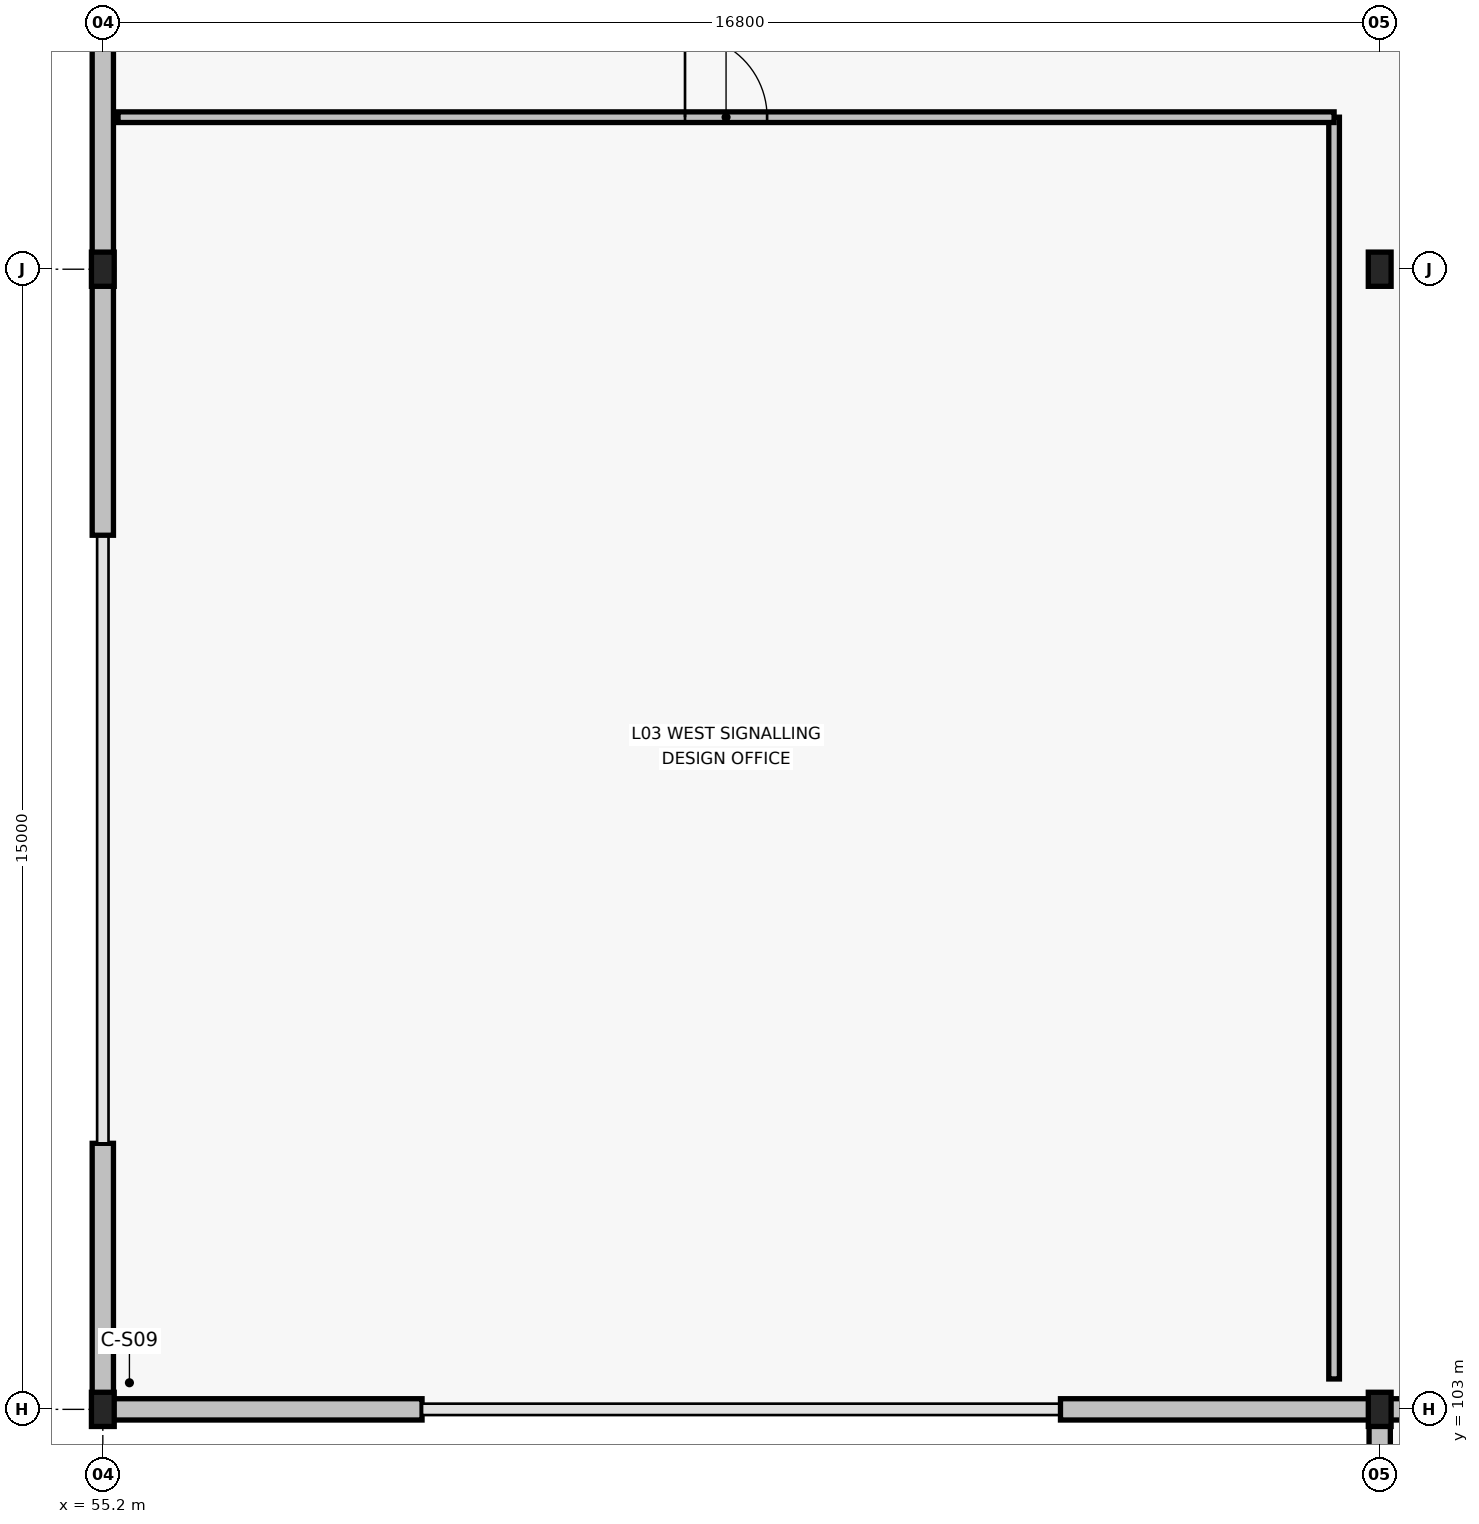
"""IFC4 building model, lengths in metres.
Left out: names, types, materials, properties, quantities, classifications, styles, units other than length and angle.
Written with IfcOpenShell. Run it as: python <this file> out.ifc"""

import sys

from ifc_helpers import new_model, si_unit, direction, frame, frame_2d, origin, origin_2d, place, context, subcontext, project, spatial, rectangle, i_section, extrude, element, fill, save


model = new_model("IFC4")
c1 = context("Model", 3, precision=1e-05, world=origin(), true_north=direction((0.0, 1.0)))
c2 = subcontext(c1, "Body", "Model", "MODEL_VIEW")
j1 = project(units=[si_unit("LENGTHUNIT", "METRE"), si_unit("PLANEANGLEUNIT", "RADIAN")], contexts=[c1])
p1 = place(None, origin())
s1 = spatial("IfcSite", under=j1, at=p1, CompositionType="ELEMENT")
p2 = place(p1, origin())
s2 = spatial("IfcBuilding", under=s1, at=p2, CompositionType="ELEMENT")
p3 = place(p2, frame((0.0, 0.0, 16.8)))
s3 = spatial("IfcBuildingStorey", under=s2, at=p3, CompositionType="ELEMENT", Elevation=16.8)
for number, where, z_axis, x_axis in (
    (1, (55.2, 103.0, 0.0), (0.0, 0.0, 1.0), (1.0, 0.0, 0.0)),
    (2, (55.2, 118.0, 0.0), (0.0, 0.0, 1.0), (1.0, 0.0, 0.0)),
    (3, (72.0, 103.0, 0.0), (0.0, 0.0, 1.0), (1.0, 0.0, 0.0)),
    (4, (72.0, 118.0, 0.0), (0.0, 0.0, 1.0), (1.0, 0.0, 0.0)),
):
    element("IfcColumn", number, at=place(p3, frame(where, z_axis=z_axis, x_axis=x_axis)), inside=s3, PredefinedType="COLUMN", context=c2, shape_type="SweptSolid", body=[
        extrude(i_section(OverallWidth=0.3, OverallDepth=0.45, WebThickness=0.014, FlangeThickness=0.026, FilletRadius=0.027, at=origin_2d()), origin(), (0.0, 0.0, 1.0), 4.2),
    ])
for number, where, z_axis, x_axis in (
    (5, (55.2, 103.0, 0.0), (0.0, 0.0, 1.0), (1.0, 0.0, 0.0)),
    (6, (67.8, 103.0, 0.0), (0.0, 0.0, 1.0), (1.0, 0.0, 0.0)),
    (7, (72.0, 103.0, 0.0), (0.0, 0.0, 1.0), (1.0, 0.0, 0.0)),
):
    element("IfcWall", number, at=place(p3, frame(where, z_axis=z_axis, x_axis=x_axis)), inside=s3, PredefinedType="STANDARD", context=c2, shape_type="SweptSolid", body=[
        extrude(rectangle(XDim=4.2, YDim=0.28, at=frame_2d((2.1, 0.0))), origin(), (0.0, 0.0, 1.0), 3.605),
    ])
p4 = place(p3, frame((55.2, 103.14, 0.0), z_axis=(0.0, 0.0, 1.0), x_axis=(0.0, 1.0, 0.0)))
e8 = element("IfcWall", 8, at=p4, inside=s3, PredefinedType="STANDARD", context=c2, shape_type="SweptSolid", body=[
    extrude(rectangle(XDim=3.36, YDim=0.28, at=frame_2d((1.68, 0.0))), origin(), (0.0, 0.0, 1.0), 3.605),
])
for number, where, z_axis, x_axis in (
    (9, (55.2, 114.5, 0.0), (0.0, 0.0, 1.0), (0.0, 1.0, 0.0)),
    (10, (55.2, 118.0, 0.0), (0.0, 0.0, 1.0), (0.0, 1.0, 0.0)),
):
    element("IfcWall", number, at=place(p3, frame(where, z_axis=z_axis, x_axis=x_axis)), inside=s3, PredefinedType="STANDARD", context=c2, shape_type="SweptSolid", body=[
        extrude(rectangle(XDim=3.5, YDim=0.28, at=frame_2d((1.75, 0.0))), origin(), (0.0, 0.0, 1.0), 3.605),
    ])
p5 = place(p3, frame((72.0, 102.14, 0.0), z_axis=(0.0, 0.0, 1.0), x_axis=(0.0, 1.0, 0.0)))
e11 = element("IfcWall", 11, at=p5, inside=s3, PredefinedType="STANDARD", context=c2, shape_type="SweptSolid", body=[
    extrude(rectangle(XDim=0.72, YDim=0.28, at=frame_2d((0.36, 0.0))), origin(), (0.0, 0.0, 1.0), 3.37),
])
p6 = place(p3, frame((71.4, 103.4, 0.0), z_axis=(0.0, 0.0, 1.0), x_axis=(0.0, 1.0, 0.0)))
e12 = element("IfcWall", 12, at=p6, inside=s3, PredefinedType="PARTITIONING", context=c2, shape_type="SweptSolid", body=[
    extrude(rectangle(XDim=16.6, YDim=0.14, at=frame_2d((8.3, 0.0))), origin(), (0.0, 0.0, 1.0), 3.495),
])
p7 = place(p3, frame((71.4, 120.0, 0.0), z_axis=(0.0, 0.0, 1.0), x_axis=(-1.0, 0.0, 0.0)))
e13 = element("IfcWall", 13, at=p7, inside=s3, PredefinedType="PARTITIONING", context=c2, shape_type="SweptSolid", body=[
    extrude(rectangle(XDim=16.0, YDim=0.14, at=frame_2d((8.0, 0.0))), origin(), (0.0, 0.0, 1.0), 4.0),
])
p8 = place(p7, frame((7.46, 0.0, 0.0)))
e14 = element("IfcOpeningElement", 14, at=p8, cuts=e13, PredefinedType="OPENING", context=c2, shape_type="SweptSolid", body=[
    extrude(rectangle(XDim=1.08, YDim=2.1, at=frame_2d((0.54, 1.05))), frame((0.0, 0.08, 0.0), z_axis=(0.0, -1.0, 0.0), x_axis=(1.0, 0.0, 0.0)), (0.0, 0.0, 1.0), 0.16),
])
p9 = place(p8, origin())
e15 = element("IfcDoor", 15, at=p9, inside=s3, OperationType="SINGLE_SWING_RIGHT", PredefinedType="DOOR", context=c2, shape_type="SweptSolid", body=[
    extrude(rectangle(XDim=1.08, YDim=2.1, at=frame_2d((0.54, 1.05))), frame((0.0, 0.025, 0.0), z_axis=(0.0, -1.0, 0.0), x_axis=(1.0, 0.0, 0.0)), (0.0, 0.0, 1.0), 0.05),
])
fill(e14, e15)
save(model, sys.argv[1])
